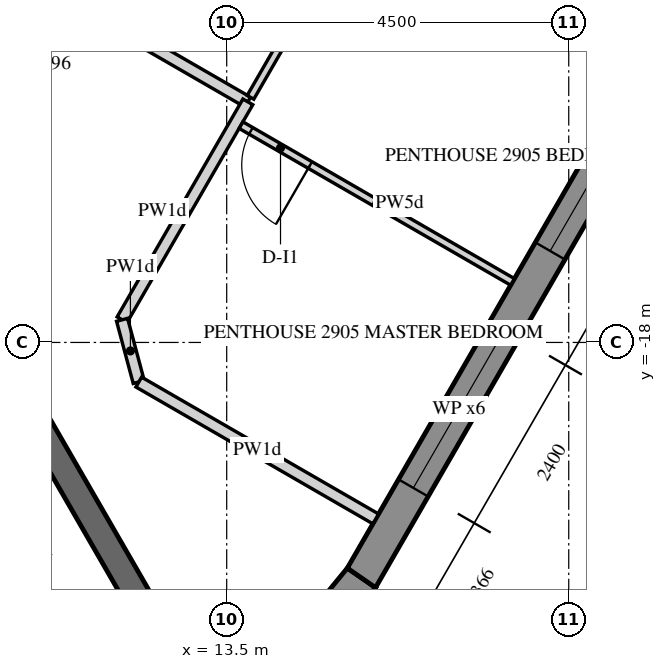
"""IFC4 building model, lengths in metres.
Left out: names, types, materials, properties, quantities, classifications, styles, units other than length and angle.
Written with IfcOpenShell. Run it as: python <this file> out.ifc"""

import sys

from ifc_helpers import new_model, si_unit, direction, frame, frame_2d, origin, place, context, subcontext, project, spatial, polyline, rectangle, outline, extrude, element, fill, save


model = new_model("IFC4")
c1 = context("Model", 3, precision=1e-05, world=origin(), true_north=direction((0.0, 1.0)))
c2 = subcontext(c1, "Body", "Model", "MODEL_VIEW")
j1 = project(units=[si_unit("LENGTHUNIT", "METRE"), si_unit("PLANEANGLEUNIT", "RADIAN")], contexts=[c1])
p1 = place(None, origin())
s1 = spatial("IfcSite", under=j1, at=p1, CompositionType="ELEMENT")
p2 = place(p1, origin())
s2 = spatial("IfcBuilding", under=s1, at=p2, CompositionType="ELEMENT")
p3 = place(p2, frame((0.0, 0.0, 372.9)))
s3 = spatial("IfcBuildingStorey", under=s2, at=p3, CompositionType="ELEMENT", Elevation=372.9)
p4 = place(p3, frame((10.93, -21.064, -0.15), z_axis=(0.0, 0.0, 1.0), x_axis=(0.069702791886, -0.99756780261, 0.0)))
e1 = element("IfcWall", 1, at=p4, inside=s3, PredefinedType="SOLIDWALL", context=c2, shape_type="SweptSolid", body=[
    extrude(outline(polyline([(0.225, -0.225), (2.225, -0.225), (1.775, 0.225), (-0.225, 0.225), (0.225, -0.225)])), origin(), (0.0, 0.0, 1.0), 3.55),
])
p5 = place(p3, frame((14.497, -22.044, -0.15), z_axis=(0.0, 0.0, 1.0), x_axis=(0.633867343651, 0.773441782329, 0.0)))
e2 = element("IfcWall", 2, at=p5, inside=s3, PredefinedType="SOLIDWALL", context=c2, shape_type="SweptSolid", body=[
    extrude(outline(polyline([(-0.037, -0.225), (1.243, -0.225), (1.206, 0.225), (0.037, 0.225), (-0.037, -0.225)])), origin(), (0.0, 0.0, 1.0), 3.55),
])
p6 = place(p3, frame((15.273, -21.097, -0.15), z_axis=(0.0, 0.0, 1.0), x_axis=(0.499997453958, 0.866026873738, 0.0)))
e3 = element("IfcWall", 3, at=p6, inside=s3, PredefinedType="SOLIDWALL", context=c2, shape_type="SweptSolid", body=[
    extrude(outline(polyline([(-0.018, -0.225), (23.152, -0.225), (23.11, 0.225), (0.018, 0.225), (-0.018, -0.225)])), origin(), (0.0, 0.0, 1.0), 3.55),
])
p7 = place(p6, frame((1.366, 0.0, 0.45)))
e4 = element("IfcOpeningElement", 4, at=p7, cuts=e3, PredefinedType="OPENING", context=c2, shape_type="SweptSolid", body=[
    extrude(rectangle(XDim=2.4, YDim=3.0, at=frame_2d((1.2, 1.5))), frame((0.0, 0.235, 0.0), z_axis=(0.0, -1.0, 0.0), x_axis=(1.0, 0.0, 0.0)), (0.0, 0.0, 1.0), 0.47),
])
p8 = place(p6, frame((4.966, 0.0, 0.45)))
e5 = element("IfcOpeningElement", 5, at=p8, cuts=e3, PredefinedType="OPENING", context=c2, shape_type="SweptSolid", body=[
    extrude(rectangle(XDim=2.4, YDim=3.0, at=frame_2d((1.2, 1.5))), frame((0.0, 0.235, 0.0), z_axis=(0.0, -1.0, 0.0), x_axis=(1.0, 0.0, 0.0)), (0.0, 0.0, 1.0), 0.47),
])
p9 = place(p6, frame((8.566, 0.0, 0.45)))
e6 = element("IfcOpeningElement", 6, at=p9, cuts=e3, PredefinedType="OPENING", context=c2, shape_type="SweptSolid", body=[
    extrude(rectangle(XDim=2.4, YDim=3.0, at=frame_2d((1.2, 1.5))), frame((0.0, 0.235, 0.0), z_axis=(0.0, -1.0, 0.0), x_axis=(1.0, 0.0, 0.0)), (0.0, 0.0, 1.0), 0.47),
])
p10 = place(p6, frame((12.166, 0.0, 0.45)))
e7 = element("IfcOpeningElement", 7, at=p10, cuts=e3, PredefinedType="OPENING", context=c2, shape_type="SweptSolid", body=[
    extrude(rectangle(XDim=2.4, YDim=3.0, at=frame_2d((1.2, 1.5))), frame((0.0, 0.235, 0.0), z_axis=(0.0, -1.0, 0.0), x_axis=(1.0, 0.0, 0.0)), (0.0, 0.0, 1.0), 0.47),
])
p11 = place(p6, frame((15.766, 0.0, 0.45)))
e8 = element("IfcOpeningElement", 8, at=p11, cuts=e3, PredefinedType="OPENING", context=c2, shape_type="SweptSolid", body=[
    extrude(rectangle(XDim=2.4, YDim=3.0, at=frame_2d((1.2, 1.5))), frame((0.0, 0.235, 0.0), z_axis=(0.0, -1.0, 0.0), x_axis=(1.0, 0.0, 0.0)), (0.0, 0.0, 1.0), 0.47),
])
p12 = place(p6, frame((19.366, 0.0, 0.45)))
e9 = element("IfcOpeningElement", 9, at=p12, cuts=e3, PredefinedType="OPENING", context=c2, shape_type="SweptSolid", body=[
    extrude(rectangle(XDim=2.4, YDim=3.0, at=frame_2d((1.2, 1.5))), frame((0.0, 0.235, 0.0), z_axis=(0.0, -1.0, 0.0), x_axis=(1.0, 0.0, 0.0)), (0.0, 0.0, 1.0), 0.47),
])
p13 = place(p3, frame((5.773, -10.0, -0.15), z_axis=(0.0, 0.0, 1.0), x_axis=(0.500007911273, -0.866020836161, 0.0)))
e10 = element("IfcWall", 10, at=p13, inside=s3, PredefinedType="SHEAR", context=c2, shape_type="SweptSolid", body=[
    extrude(rectangle(XDim=14.51, YDim=0.35, at=frame_2d((7.255, 0.0))), origin(), (0.0, 0.0, 1.0), 3.55),
])
p14 = place(p13, frame((6.355, 0.0, 0.15)))
e11 = element("IfcOpeningElement", 11, at=p14, cuts=e10, PredefinedType="OPENING", context=c2, shape_type="SweptSolid", body=[
    extrude(rectangle(XDim=1.8, YDim=2.4, at=frame_2d((0.9, 1.2))), frame((0.0, 0.185, 0.0), z_axis=(0.0, -1.0, 0.0), x_axis=(1.0, 0.0, 0.0)), (0.0, 0.0, 1.0), 0.37),
])
p15 = place(p3, frame((13.777, -14.838, 0.0), z_axis=(0.0, 0.0, 1.0), x_axis=(-0.866047807691, 0.499961193289, 0.0)))
e12 = element("IfcWall", 12, at=p15, inside=s3, PredefinedType="PARTITIONING", context=c2, shape_type="SweptSolid", body=[
    extrude(rectangle(XDim=3.6, YDim=0.15, at=frame_2d((1.8, 0.0))), origin(), (0.0, 0.0, 1.0), 2.47),
])
p16 = place(p3, frame((12.124, -17.701, 0.0), z_axis=(0.0, 0.0, 1.0), x_axis=(0.500018282537, 0.866014848099, 0.0)))
e13 = element("IfcWall", 13, at=p16, inside=s3, PredefinedType="PARTITIONING", context=c2, shape_type="SweptSolid", body=[
    extrude(rectangle(XDim=3.31, YDim=0.15, at=frame_2d((1.655, 0.0))), origin(), (0.0, 0.0, 1.0), 2.47),
])
p17 = place(p3, frame((12.343, -18.521, 0.0), z_axis=(0.0, 0.0, 1.0), x_axis=(-0.258846545656, 0.965918457118, 0.0)))
e14 = element("IfcWall", 14, at=p17, inside=s3, PredefinedType="PARTITIONING", context=c2, shape_type="SweptSolid", body=[
    extrude(rectangle(XDim=0.847, YDim=0.15, at=frame_2d((0.423, 0.0))), origin(), (0.0, 0.0, 1.0), 2.47),
])
p18 = place(p3, frame((15.461, -20.321, 0.0), z_axis=(0.0, 0.0, 1.0), x_axis=(-0.866030854095, 0.499990559667, 0.0)))
e15 = element("IfcWall", 15, at=p18, inside=s3, PredefinedType="PARTITIONING", context=c2, shape_type="SweptSolid", body=[
    extrude(rectangle(XDim=3.6, YDim=0.15, at=frame_2d((1.8, 0.0))), origin(), (0.0, 0.0, 1.0), 2.47),
])
p19 = place(p3, frame((13.813, -14.775, 0.0), z_axis=(0.0, 0.0, 1.0), x_axis=(0.500101476366, 0.86596680845, 0.0)))
e16 = element("IfcWall", 16, at=p19, inside=s3, PredefinedType="PARTITIONING", context=c2, shape_type="SweptSolid", body=[
    extrude(rectangle(XDim=2.379, YDim=0.1, at=frame_2d((1.189, 0.0))), origin(), (0.0, 0.0, 1.0), 2.47),
])
p20 = place(p3, frame((17.261, -17.204, 0.0), z_axis=(0.0, 0.0, 1.0), x_axis=(-0.866034795751, 0.499983732284, 0.0)))
e17 = element("IfcWall", 17, at=p20, inside=s3, PredefinedType="PARTITIONING", context=c2, shape_type="SweptSolid", body=[
    extrude(rectangle(XDim=4.125, YDim=0.1, at=frame_2d((2.062, 0.0))), origin(), (0.0, 0.0, 1.0), 2.47),
])
p21 = place(p20, frame((3.075, 0.0, 0.0)))
e18 = element("IfcOpeningElement", 18, at=p21, cuts=e17, PredefinedType="OPENING", context=c2, shape_type="SweptSolid", body=[
    extrude(rectangle(XDim=0.9, YDim=2.1, at=frame_2d((0.45, 1.05))), frame((0.0, 0.06, 0.0), z_axis=(0.0, -1.0, 0.0), x_axis=(1.0, 0.0, 0.0)), (0.0, 0.0, 1.0), 0.12),
])
p22 = place(p7, frame((0.0, 0.155, 0.0)))
e19 = element("IfcWindow", 19, at=p22, inside=s3, PartitioningType="DOUBLE_PANEL_VERTICAL", PredefinedType="WINDOW", context=c2, shape_type="SweptSolid", body=[
    extrude(rectangle(XDim=2.4, YDim=3.0, at=frame_2d((1.2, 1.5))), frame((0.0, 0.03, 0.0), z_axis=(0.0, -1.0, 0.0), x_axis=(1.0, 0.0, 0.0)), (0.0, 0.0, 1.0), 0.06),
])
fill(e4, e19)
p23 = place(p8, frame((0.0, 0.155, 0.0)))
e20 = element("IfcWindow", 20, at=p23, inside=s3, PartitioningType="DOUBLE_PANEL_VERTICAL", PredefinedType="WINDOW", context=c2, shape_type="SweptSolid", body=[
    extrude(rectangle(XDim=2.4, YDim=3.0, at=frame_2d((1.2, 1.5))), frame((0.0, 0.03, 0.0), z_axis=(0.0, -1.0, 0.0), x_axis=(1.0, 0.0, 0.0)), (0.0, 0.0, 1.0), 0.06),
])
fill(e5, e20)
p24 = place(p21, origin())
e21 = element("IfcDoor", 21, at=p24, inside=s3, OperationType="SINGLE_SWING_RIGHT", PredefinedType="DOOR", context=c2, shape_type="SweptSolid", body=[
    extrude(rectangle(XDim=0.9, YDim=2.1, at=frame_2d((0.45, 1.05))), frame((0.0, 0.025, 0.0), z_axis=(0.0, -1.0, 0.0), x_axis=(1.0, 0.0, 0.0)), (0.0, 0.0, 1.0), 0.05),
])
fill(e18, e21)
save(model, sys.argv[1])
